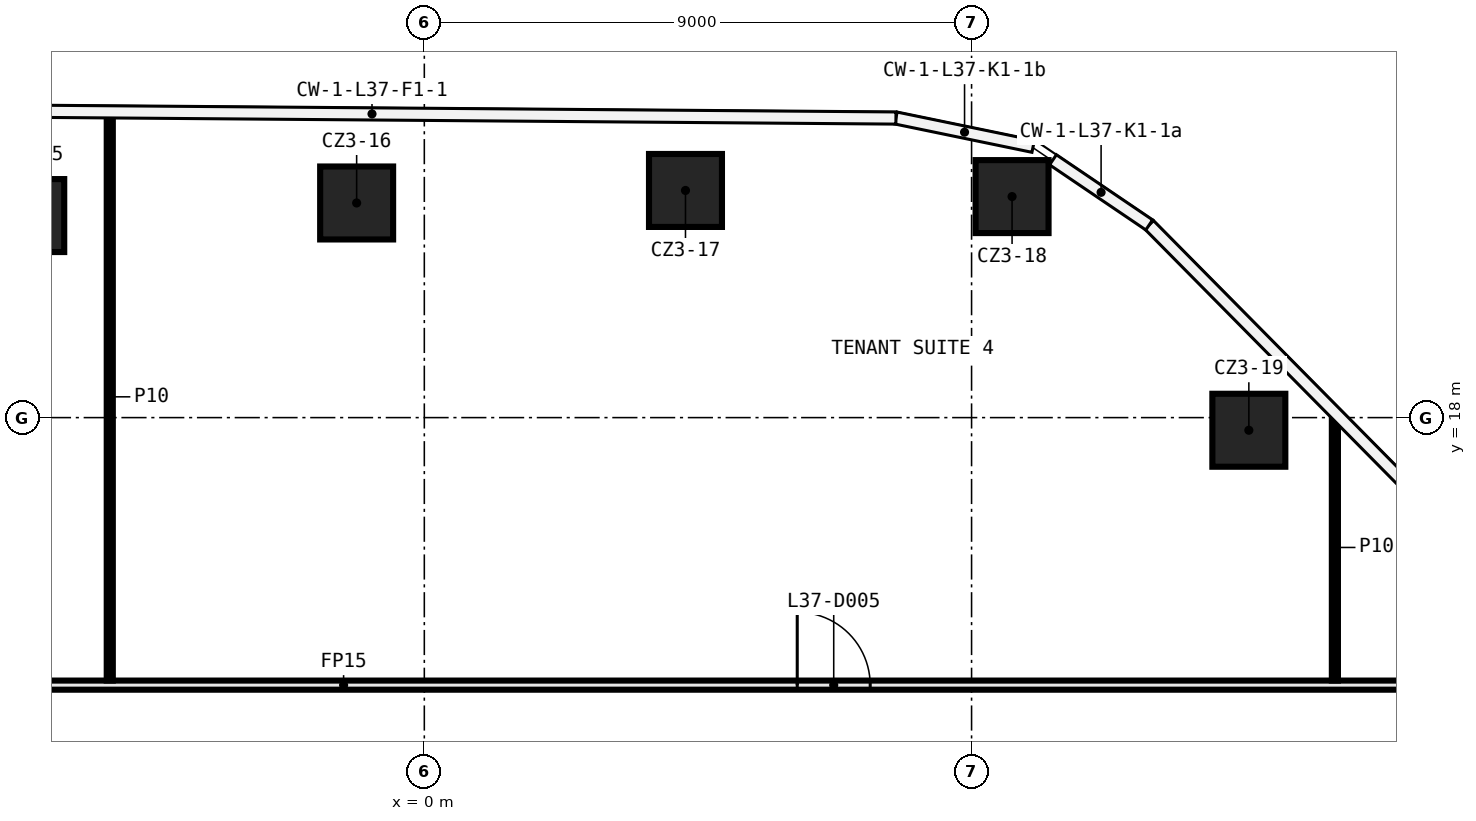
"""IFC4 building model, lengths in metres.
Left out: names, types, materials, properties, quantities, classifications, styles, units other than length and angle.
Written with IfcOpenShell. Run it as: python <this file> out.ifc"""

import sys

from ifc_helpers import new_model, si_unit, direction, frame, frame_2d, origin, origin_2d, place, context, subcontext, project, spatial, rectangle, extrude, element, fill, save


model = new_model("IFC4")
c1 = context("Model", 3, precision=1e-05, world=origin(), true_north=direction((0.0, 1.0)))
c2 = subcontext(c1, "Body", "Model", "MODEL_VIEW")
j1 = project(units=[si_unit("LENGTHUNIT", "METRE"), si_unit("PLANEANGLEUNIT", "RADIAN")], contexts=[c1])
p1 = place(None, origin())
s1 = spatial("IfcSite", under=j1, at=p1, CompositionType="ELEMENT")
p2 = place(p1, origin())
s2 = spatial("IfcBuilding", under=s1, at=p2, CompositionType="ELEMENT")
p3 = place(p2, frame((0.0, 0.0, 171.2)))
s3 = spatial("IfcBuildingStorey", under=s2, at=p3, CompositionType="ELEMENT", Elevation=171.2)
for number, where, z_axis, x_axis in (
    (1, (-6.522, 21.323, 0.0), (0.0, 0.0, 1.0), (1.0, 0.0, 0.0)),
    (2, (-1.113, 21.53, 0.0), (0.0, 0.0, 1.0), (1.0, 0.0, 0.0)),
    (3, (4.295, 21.736, 0.0), (0.0, 0.0, 1.0), (1.0, 0.0, 0.0)),
    (4, (9.666, 21.635, 0.0), (0.0, 0.0, 1.0), (1.0, 0.0, 0.0)),
    (5, (13.56, 17.792, 0.0), (0.0, 0.0, 1.0), (1.0, 0.0, 0.0)),
):
    element("IfcColumn", number, at=place(p3, frame(where, z_axis=z_axis, x_axis=x_axis)), inside=s3, PredefinedType="COLUMN", context=c2, shape_type="SweptSolid", body=[
        extrude(rectangle(XDim=1.2, YDim=1.2, at=origin_2d()), origin(), (0.0, 0.0, 1.0), 3.82),
    ])
p4 = place(p3, frame((-15.842, 13.6, 0.0), z_axis=(0.0, 0.0, 1.0), x_axis=(1.0, 0.0, 0.0)))
e6 = element("IfcWall", 6, at=p4, inside=s3, PredefinedType="PARTITIONING", context=c2, shape_type="SweptSolid", body=[
    extrude(rectangle(XDim=32.502, YDim=0.15, at=frame_2d((16.251, 0.0))), origin(), (0.0, 0.0, 1.0), 3.82),
])
p5 = place(p4, frame((21.974, 0.0, 0.0)))
e7 = element("IfcOpeningElement", 7, at=p5, cuts=e6, PredefinedType="OPENING", context=c2, shape_type="SweptSolid", body=[
    extrude(rectangle(XDim=1.2, YDim=2.1, at=frame_2d((0.6, 1.05))), frame((0.0, 0.085, 0.0), z_axis=(0.0, -1.0, 0.0), x_axis=(1.0, 0.0, 0.0)), (0.0, 0.0, 1.0), 0.17),
])
p6 = place(p4, frame((5.854, 0.0, 0.0)))
e8 = element("IfcOpeningElement", 8, at=p6, cuts=e6, PredefinedType="OPENING", context=c2, shape_type="SweptSolid", body=[
    extrude(rectangle(XDim=1.2, YDim=2.1, at=frame_2d((0.6, 1.05))), frame((0.0, 0.085, 0.0), z_axis=(0.0, -1.0, 0.0), x_axis=(1.0, 0.0, 0.0)), (0.0, 0.0, 1.0), 0.17),
])
p7 = place(p3, frame((14.975, 13.675, 0.0), z_axis=(0.0, 0.0, 1.0), x_axis=(0.0, 1.0, 0.0)))
e9 = element("IfcWall", 9, at=p7, inside=s3, PredefinedType="PARTITIONING", context=c2, shape_type="SweptSolid", body=[
    extrude(rectangle(XDim=4.379, YDim=0.1, at=frame_2d((2.189, 0.0))), origin(), (0.0, 0.0, 1.0), 3.82),
])
p8 = place(p3, frame((-5.173, 13.675, 0.0), z_axis=(0.0, 0.0, 1.0), x_axis=(0.0, 1.0, 0.0)))
e10 = element("IfcWall", 10, at=p8, inside=s3, PredefinedType="PARTITIONING", context=c2, shape_type="SweptSolid", body=[
    extrude(rectangle(XDim=9.333, YDim=0.1, at=frame_2d((4.667, 0.0))), origin(), (0.0, 0.0, 1.0), 3.82),
])
p9 = place(p5, origin())
e11 = element("IfcDoor", 11, at=p9, inside=s3, OperationType="SINGLE_SWING_RIGHT", PredefinedType="DOOR", context=c2, shape_type="SweptSolid", body=[
    extrude(rectangle(XDim=1.2, YDim=2.1, at=frame_2d((0.6, 1.05))), frame((0.0, 0.025, 0.0), z_axis=(0.0, -1.0, 0.0), x_axis=(1.0, 0.0, 0.0)), (0.0, 0.0, 1.0), 0.05),
])
fill(e7, e11)
save(model, sys.argv[1])
